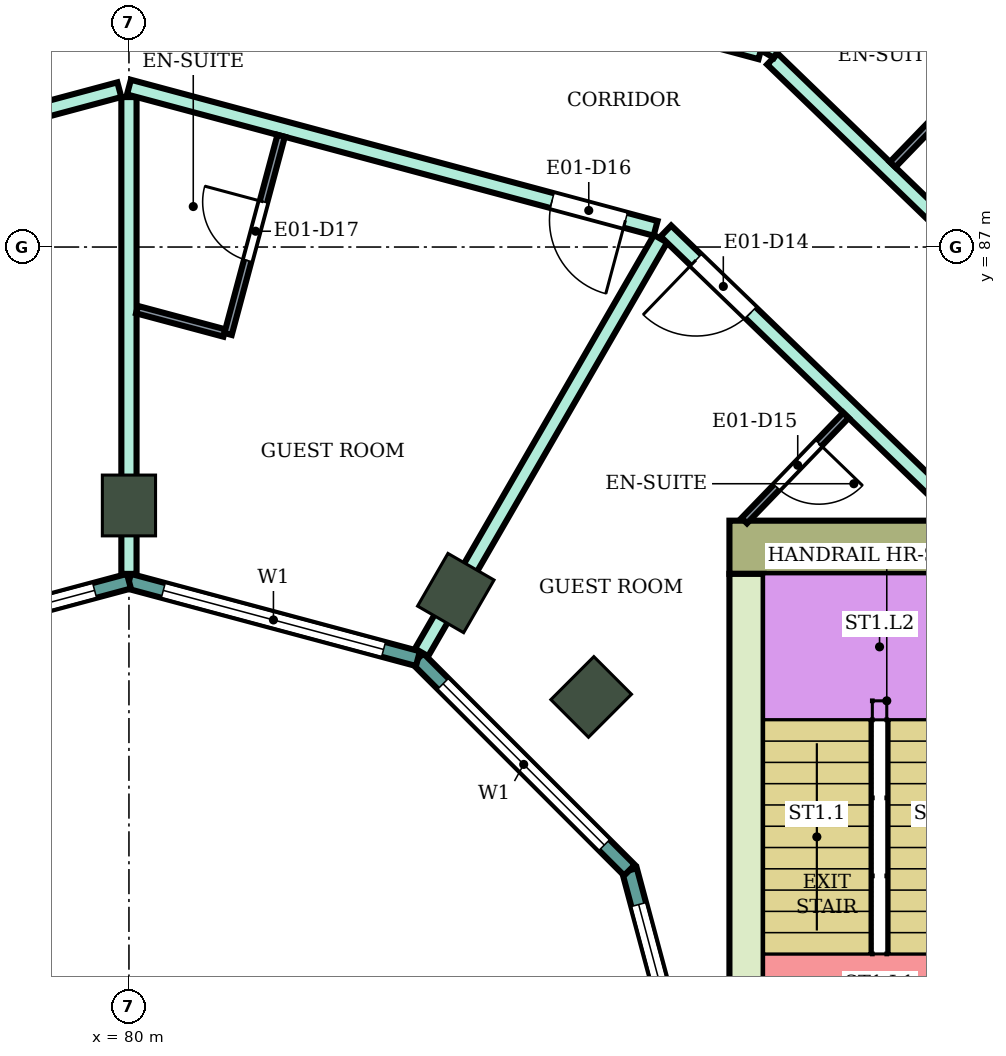
"""IFC4 building model, lengths in metres.
Left out: names, types, materials, properties, quantities, classifications, styles, units other than length and angle.
Written with IfcOpenShell. Run it as: python <this file> out.ifc"""

import sys

from ifc_helpers import new_model, si_unit, direction, frame, frame_2d, origin, origin_2d, place, context, subcontext, project, spatial, rectangle, extrude, element, fill, save


model = new_model("IFC4")
c1 = context("Model", 3, precision=1e-05, world=origin(), true_north=direction((0.0, 1.0)))
c2 = subcontext(c1, "Body", "Model", "MODEL_VIEW")
j1 = project(units=[si_unit("LENGTHUNIT", "METRE"), si_unit("PLANEANGLEUNIT", "RADIAN")], contexts=[c1])
p1 = place(None, origin())
s1 = spatial("IfcSite", under=j1, at=p1, CompositionType="ELEMENT")
p2 = place(p1, origin())
s2 = spatial("IfcBuilding", under=s1, at=p2, CompositionType="ELEMENT")
p3 = place(p2, frame((0.0, 0.0, 118.5)))
s3 = spatial("IfcBuildingStorey", under=s2, at=p3, CompositionType="ELEMENT", Elevation=118.5)
for number, where, z_axis, x_axis in (
    (1, (86.081, 81.081, 0.0), (0.0, 0.0, 1.0), (0.707, 0.707, 0.0)),
    (2, (84.3, 82.448, 0.0), (0.0, 0.0, 1.0), (0.5, 0.866, 0.0)),
    (3, (80.0, 83.6, 0.0), (0.0, 0.0, 1.0), (0.0, 1.0, 0.0)),
):
    element("IfcColumn", number, at=place(p3, frame(where, z_axis=z_axis, x_axis=x_axis)), inside=s3, PredefinedType="COLUMN", context=c2, shape_type="SweptSolid", body=[
        extrude(rectangle(XDim=0.8, YDim=0.7, at=origin_2d()), origin(), (0.0, 0.0, 1.0), 3.9),
    ])
p4 = place(p3, frame((87.9, 83.05, 0.0), z_axis=(0.0, 0.0, 1.0), x_axis=(1.0, 0.0, 0.0)))
e4 = element("IfcWall", 4, at=p4, inside=s3, PredefinedType="SHEAR", context=c2, shape_type="SweptSolid", body=[
    extrude(rectangle(XDim=14.8, YDim=0.7, at=frame_2d((7.4, 0.0))), origin(), (0.0, 0.0, 1.0), 3.58),
])
p5 = place(p4, frame((4.2, 0.0, 0.0)))
e5 = element("IfcOpeningElement", 5, at=p5, cuts=e4, PredefinedType="OPENING", context=c2, shape_type="SweptSolid", body=[
    extrude(rectangle(XDim=2.4, YDim=2.4, at=frame_2d((1.2, 1.2))), frame((0.0, 0.36, 0.0), z_axis=(0.0, -1.0, 0.0), x_axis=(1.0, 0.0, 0.0)), (0.0, 0.0, 1.0), 0.72),
])
p6 = place(p3, frame((88.125, 75.0, 0.0), z_axis=(0.0, 0.0, 1.0), x_axis=(0.0, 1.0, 0.0)))
e6 = element("IfcWall", 6, at=p6, inside=s3, PredefinedType="SHEAR", context=c2, shape_type="SweptSolid", body=[
    extrude(rectangle(XDim=7.7, YDim=0.45, at=frame_2d((3.85, 0.0))), origin(), (0.0, 0.0, 1.0), 3.58),
])
p7 = place(p3, frame((87.604, 75.0, 0.0), z_axis=(0.0, 0.0, 1.0), x_axis=(-0.258789828301, 0.965933654434, 0.0)))
e7 = element("IfcWall", 7, at=p7, inside=s3, PredefinedType="NOTDEFINED", context=c2, shape_type="SweptSolid", body=[
    extrude(rectangle(XDim=3.936, YDim=0.2, at=frame_2d((1.968, 0.0))), origin(), (0.0, 0.0, 1.0), 3.9),
])
p8 = place(p7, frame((0.468, 0.0, 0.9)))
e8 = element("IfcOpeningElement", 8, at=p8, cuts=e7, PredefinedType="OPENING", context=c2, shape_type="SweptSolid", body=[
    extrude(rectangle(XDim=3.0, YDim=2.3, at=frame_2d((1.5, 1.15))), frame((0.0, 0.11, 0.0), z_axis=(0.0, -1.0, 0.0), x_axis=(1.0, 0.0, 0.0)), (0.0, 0.0, 1.0), 0.22),
])
p9 = place(p3, frame((86.585, 78.802, 0.0), z_axis=(0.0, 0.0, 1.0), x_axis=(-0.707106781187, 0.707106781187, 0.0)))
e9 = element("IfcWall", 9, at=p9, inside=s3, PredefinedType="NOTDEFINED", context=c2, shape_type="SweptSolid", body=[
    extrude(rectangle(XDim=3.936, YDim=0.2, at=frame_2d((1.968, 0.0))), origin(), (0.0, 0.0, 1.0), 3.9),
])
p10 = place(p9, frame((0.468, 0.0, 0.9)))
e10 = element("IfcOpeningElement", 10, at=p10, cuts=e9, PredefinedType="OPENING", context=c2, shape_type="SweptSolid", body=[
    extrude(rectangle(XDim=3.0, YDim=2.3, at=frame_2d((1.5, 1.15))), frame((0.0, 0.11, 0.0), z_axis=(0.0, -1.0, 0.0), x_axis=(1.0, 0.0, 0.0)), (0.0, 0.0, 1.0), 0.22),
])
p11 = place(p3, frame((83.802, 81.585, 0.0), z_axis=(0.0, 0.0, 1.0), x_axis=(-0.965933654434, 0.258789828301, 0.0)))
e11 = element("IfcWall", 11, at=p11, inside=s3, PredefinedType="NOTDEFINED", context=c2, shape_type="SweptSolid", body=[
    extrude(rectangle(XDim=3.936, YDim=0.2, at=frame_2d((1.968, 0.0))), origin(), (0.0, 0.0, 1.0), 3.9),
])
p12 = place(p11, frame((0.468, 0.0, 0.9)))
e12 = element("IfcOpeningElement", 12, at=p12, cuts=e11, PredefinedType="OPENING", context=c2, shape_type="SweptSolid", body=[
    extrude(rectangle(XDim=3.0, YDim=2.3, at=frame_2d((1.5, 1.15))), frame((0.0, 0.11, 0.0), z_axis=(0.0, -1.0, 0.0), x_axis=(1.0, 0.0, 0.0)), (0.0, 0.0, 1.0), 0.22),
])
p13 = place(p3, frame((80.0, 82.604, 0.0), z_axis=(0.0, 0.0, 1.0), x_axis=(-0.965933654434, -0.258789828301, 0.0)))
e13 = element("IfcWall", 13, at=p13, inside=s3, PredefinedType="NOTDEFINED", context=c2, shape_type="SweptSolid", body=[
    extrude(rectangle(XDim=3.936, YDim=0.2, at=frame_2d((1.968, 0.0))), origin(), (0.0, 0.0, 1.0), 3.9),
])
p14 = place(p13, frame((0.468, 0.0, 0.9)))
e14 = element("IfcOpeningElement", 14, at=p14, cuts=e13, PredefinedType="OPENING", context=c2, shape_type="SweptSolid", body=[
    extrude(rectangle(XDim=3.0, YDim=2.3, at=frame_2d((1.5, 1.15))), frame((0.0, 0.11, 0.0), z_axis=(0.0, -1.0, 0.0), x_axis=(1.0, 0.0, 0.0)), (0.0, 0.0, 1.0), 0.22),
])
p15 = place(p3, frame((71.614, 89.55, 0.0), z_axis=(0.0, 0.0, 1.0), x_axis=(0.965967958589, 0.258661753994, 0.0)))
e15 = element("IfcWall", 15, at=p15, inside=s3, PredefinedType="PARTITIONING", context=c2, shape_type="SweptSolid", body=[
    extrude(rectangle(XDim=8.592, YDim=0.2, at=frame_2d((4.296, 0.0))), origin(), (0.0, 0.0, 1.0), 3.45),
])
p16 = place(p15, frame((0.55, 0.0, 0.0)))
e16 = element("IfcOpeningElement", 16, at=p16, cuts=e15, PredefinedType="OPENING", context=c2, shape_type="SweptSolid", body=[
    extrude(rectangle(XDim=1.0, YDim=2.1, at=frame_2d((0.5, 1.05))), frame((0.0, 0.11, 0.0), z_axis=(0.0, -1.0, 0.0), x_axis=(1.0, 0.0, 0.0)), (0.0, 0.0, 1.0), 0.22),
])
p17 = place(p3, frame((72.936, 87.211, 0.0), z_axis=(0.0, 0.0, 1.0), x_axis=(0.965917703859, 0.258849356521, 0.0)))
e17 = element("IfcWall", 17, at=p17, inside=s3, PredefinedType="PARTITIONING", context=c2, shape_type="SweptSolid", body=[
    extrude(rectangle(XDim=7.182, YDim=0.2, at=frame_2d((3.591, 0.0))), origin(), (0.0, 0.0, 1.0), 3.45),
])
p18 = place(p17, frame((2.757, 0.0, 0.0)))
e18 = element("IfcOpeningElement", 18, at=p18, cuts=e17, PredefinedType="OPENING", context=c2, shape_type="SweptSolid", body=[
    extrude(rectangle(XDim=1.8, YDim=2.1, at=frame_2d((0.9, 1.05))), frame((0.0, 0.11, 0.0), z_axis=(0.0, -1.0, 0.0), x_axis=(1.0, 0.0, 0.0)), (0.0, 0.0, 1.0), 0.22),
])
p19 = place(p3, frame((80.0, 82.7, 0.0), z_axis=(0.0, 0.0, 1.0), x_axis=(0.0, 1.0, 0.0)))
e19 = element("IfcWall", 19, at=p19, inside=s3, PredefinedType="PARTITIONING", context=c2, shape_type="SweptSolid", body=[
    extrude(rectangle(XDim=6.273, YDim=0.2, at=frame_2d((3.136, 0.0))), origin(), (0.0, 0.0, 1.0), 3.45),
])
p20 = place(p3, frame((80.0, 89.104, 0.0), z_axis=(0.0, 0.0, 1.0), x_axis=(0.965856548257, -0.259077455964, 0.0)))
e20 = element("IfcWall", 20, at=p20, inside=s3, PredefinedType="PARTITIONING", context=c2, shape_type="SweptSolid", body=[
    extrude(rectangle(XDim=7.173, YDim=0.2, at=frame_2d((3.586, 0.0))), origin(), (0.0, 0.0, 1.0), 3.45),
])
p21 = place(p20, frame((5.763, 0.0, 0.0)))
e21 = element("IfcOpeningElement", 21, at=p21, cuts=e20, PredefinedType="OPENING", context=c2, shape_type="SweptSolid", body=[
    extrude(rectangle(XDim=1.0, YDim=2.1, at=frame_2d((0.5, 1.05))), frame((0.0, 0.11, 0.0), z_axis=(0.0, -1.0, 0.0), x_axis=(1.0, 0.0, 0.0)), (0.0, 0.0, 1.0), 0.22),
])
p22 = place(p3, frame((80.0, 91.797, 0.0), z_axis=(0.0, 0.0, 1.0), x_axis=(0.965857042792, -0.259075612301, 0.0)))
e22 = element("IfcWall", 22, at=p22, inside=s3, PredefinedType="PARTITIONING", context=c2, shape_type="SweptSolid", body=[
    extrude(rectangle(XDim=8.602, YDim=0.2, at=frame_2d((4.301, 0.0))), origin(), (0.0, 0.0, 1.0), 3.45),
])
p23 = place(p22, frame((4.877, 0.0, 0.0)))
e23 = element("IfcOpeningElement", 23, at=p23, cuts=e22, PredefinedType="OPENING", context=c2, shape_type="SweptSolid", body=[
    extrude(rectangle(XDim=1.0, YDim=2.1, at=frame_2d((0.5, 1.05))), frame((0.0, 0.11, 0.0), z_axis=(0.0, -1.0, 0.0), x_axis=(1.0, 0.0, 0.0)), (0.0, 0.0, 1.0), 0.22),
])
p24 = place(p22, frame((2.817, 0.0, 0.0)))
e24 = element("IfcOpeningElement", 24, at=p24, cuts=e22, PredefinedType="OPENING", context=c2, shape_type="SweptSolid", body=[
    extrude(rectangle(XDim=1.0, YDim=2.1, at=frame_2d((0.5, 1.05))), frame((0.0, 0.11, 0.0), z_axis=(0.0, -1.0, 0.0), x_axis=(1.0, 0.0, 0.0)), (0.0, 0.0, 1.0), 0.22),
])
p25 = place(p3, frame((83.85, 81.667, 0.0), z_axis=(0.0, 0.0, 1.0), x_axis=(0.500224530691, 0.865895732115, 0.0)))
e25 = element("IfcWall", 25, at=p25, inside=s3, PredefinedType="PARTITIONING", context=c2, shape_type="SweptSolid", body=[
    extrude(rectangle(XDim=6.285, YDim=0.2, at=frame_2d((3.143, 0.0))), origin(), (0.0, 0.0, 1.0), 3.45),
])
p26 = place(p3, frame((87.064, 87.211, 0.0), z_axis=(0.0, 0.0, 1.0), x_axis=(0.719540958932, -0.694450004262, 0.0)))
e26 = element("IfcWall", 26, at=p26, inside=s3, PredefinedType="PARTITIONING", context=c2, shape_type="SweptSolid", body=[
    extrude(rectangle(XDim=5.488, YDim=0.2, at=frame_2d((2.744, 0.0))), origin(), (0.0, 0.0, 1.0), 3.45),
])
p27 = place(p26, frame((0.55, 0.0, 0.0)))
e27 = element("IfcOpeningElement", 27, at=p27, cuts=e26, PredefinedType="OPENING", context=c2, shape_type="SweptSolid", body=[
    extrude(rectangle(XDim=1.0, YDim=2.1, at=frame_2d((0.5, 1.05))), frame((0.0, 0.11, 0.0), z_axis=(0.0, -1.0, 0.0), x_axis=(1.0, 0.0, 0.0)), (0.0, 0.0, 1.0), 0.22),
])
p28 = place(p3, frame((88.466, 89.473, 0.0), z_axis=(0.0, 0.0, 1.0), x_axis=(0.719346014649, -0.694651935295, 0.0)))
e28 = element("IfcWall", 28, at=p28, inside=s3, PredefinedType="PARTITIONING", context=c2, shape_type="SweptSolid", body=[
    extrude(rectangle(XDim=6.525, YDim=0.2, at=frame_2d((3.263, 0.0))), origin(), (0.0, 0.0, 1.0), 3.45),
])
p29 = place(p28, frame((5.034, 0.0, 0.0)))
e29 = element("IfcOpeningElement", 29, at=p29, cuts=e28, PredefinedType="OPENING", context=c2, shape_type="SweptSolid", body=[
    extrude(rectangle(XDim=1.0, YDim=2.1, at=frame_2d((0.5, 1.05))), frame((0.0, 0.11, 0.0), z_axis=(0.0, -1.0, 0.0), x_axis=(1.0, 0.0, 0.0)), (0.0, 0.0, 1.0), 0.22),
])
p30 = place(p3, frame((88.398, 89.539, 0.0), z_axis=(0.0, 0.0, 1.0), x_axis=(0.500217530286, 0.865899776184, 0.0)))
e30 = element("IfcWall", 30, at=p30, inside=s3, PredefinedType="PARTITIONING", context=c2, shape_type="SweptSolid", body=[
    extrude(rectangle(XDim=9.006, YDim=0.2, at=frame_2d((4.503, 0.0))), origin(), (0.0, 0.0, 1.0), 3.45),
])
p31 = place(p3, frame((80.106, 86.177, 0.0), z_axis=(0.0, 0.0, 1.0), x_axis=(0.966002973184, -0.258530957139, 0.0)))
e31 = element("IfcWall", 31, at=p31, inside=s3, PredefinedType="PARTITIONING", context=c2, shape_type="SweptSolid", body=[
    extrude(rectangle(XDim=1.19, YDim=0.1, at=frame_2d((0.595, 0.0))), origin(), (0.0, 0.0, 1.0), 3.45),
])
p32 = place(p3, frame((81.304, 85.856, 0.0), z_axis=(0.0, 0.0, 1.0), x_axis=(0.25867580527, 0.965964195904, 0.0)))
e32 = element("IfcWall", 32, at=p32, inside=s3, PredefinedType="PARTITIONING", context=c2, shape_type="SweptSolid", body=[
    extrude(rectangle(XDim=2.699, YDim=0.1, at=frame_2d((1.35, 0.0))), origin(), (0.0, 0.0, 1.0), 3.45),
])
p33 = place(p32, frame((1.0, 0.0, 0.0)))
e33 = element("IfcOpeningElement", 33, at=p33, cuts=e32, PredefinedType="OPENING", context=c2, shape_type="SweptSolid", body=[
    extrude(rectangle(XDim=0.8, YDim=2.1, at=frame_2d((0.4, 1.05))), frame((0.0, 0.06, 0.0), z_axis=(0.0, -1.0, 0.0), x_axis=(1.0, 0.0, 0.0)), (0.0, 0.0, 1.0), 0.12),
])
p34 = place(p3, frame((88.095, 83.4, 0.0), z_axis=(0.0, 0.0, 1.0), x_axis=(0.694447472534, 0.719543402368, 0.0)))
e34 = element("IfcWall", 34, at=p34, inside=s3, PredefinedType="PARTITIONING", context=c2, shape_type="SweptSolid", body=[
    extrude(rectangle(XDim=1.926, YDim=0.1, at=frame_2d((0.963, 0.0))), origin(), (0.0, 0.0, 1.0), 3.45),
])
p35 = place(p34, frame((0.613, 0.0, 0.0)))
e35 = element("IfcOpeningElement", 35, at=p35, cuts=e34, PredefinedType="OPENING", context=c2, shape_type="SweptSolid", body=[
    extrude(rectangle(XDim=0.8, YDim=2.1, at=frame_2d((0.4, 1.05))), frame((0.0, 0.06, 0.0), z_axis=(0.0, -1.0, 0.0), x_axis=(1.0, 0.0, 0.0)), (0.0, 0.0, 1.0), 0.12),
])
p36 = place(p3, frame((90.048, 88.085, 0.0), z_axis=(0.0, 0.0, 1.0), x_axis=(0.694655834207, 0.71934224956, 0.0)))
e36 = element("IfcWall", 36, at=p36, inside=s3, PredefinedType="PARTITIONING", context=c2, shape_type="SweptSolid", body=[
    extrude(rectangle(XDim=2.7, YDim=0.1, at=frame_2d((1.35, 0.0))), origin(), (0.0, 0.0, 1.0), 3.45),
])
p37 = place(p8, origin())
e37 = element("IfcWindow", 37, at=p37, inside=s3, PartitioningType="SINGLE_PANEL", PredefinedType="WINDOW", context=c2, shape_type="SweptSolid", body=[
    extrude(rectangle(XDim=3.0, YDim=2.3, at=frame_2d((1.5, 1.15))), frame((0.0, 0.03, 0.0), z_axis=(0.0, -1.0, 0.0), x_axis=(1.0, 0.0, 0.0)), (0.0, 0.0, 1.0), 0.06),
])
fill(e8, e37)
p38 = place(p10, origin())
e38 = element("IfcWindow", 38, at=p38, inside=s3, PartitioningType="SINGLE_PANEL", PredefinedType="WINDOW", context=c2, shape_type="SweptSolid", body=[
    extrude(rectangle(XDim=3.0, YDim=2.3, at=frame_2d((1.5, 1.15))), frame((0.0, 0.03, 0.0), z_axis=(0.0, -1.0, 0.0), x_axis=(1.0, 0.0, 0.0)), (0.0, 0.0, 1.0), 0.06),
])
fill(e10, e38)
p39 = place(p12, origin())
e39 = element("IfcWindow", 39, at=p39, inside=s3, PartitioningType="SINGLE_PANEL", PredefinedType="WINDOW", context=c2, shape_type="SweptSolid", body=[
    extrude(rectangle(XDim=3.0, YDim=2.3, at=frame_2d((1.5, 1.15))), frame((0.0, 0.03, 0.0), z_axis=(0.0, -1.0, 0.0), x_axis=(1.0, 0.0, 0.0)), (0.0, 0.0, 1.0), 0.06),
])
fill(e12, e39)
p40 = place(p14, origin())
e40 = element("IfcWindow", 40, at=p40, inside=s3, PartitioningType="SINGLE_PANEL", PredefinedType="WINDOW", context=c2, shape_type="SweptSolid", body=[
    extrude(rectangle(XDim=3.0, YDim=2.3, at=frame_2d((1.5, 1.15))), frame((0.0, 0.03, 0.0), z_axis=(0.0, -1.0, 0.0), x_axis=(1.0, 0.0, 0.0)), (0.0, 0.0, 1.0), 0.06),
])
fill(e14, e40)
p41 = place(p27, frame((1.0, 0.0, 0.0), z_axis=(0.0, 0.0, 1.0), x_axis=(-1.0, 0.0, 0.0)))
e41 = element("IfcDoor", 41, at=p41, inside=s3, OperationType="SINGLE_SWING_RIGHT", PredefinedType="DOOR", context=c2, shape_type="SweptSolid", body=[
    extrude(rectangle(XDim=1.0, YDim=2.1, at=frame_2d((0.5, 1.05))), frame((0.0, 0.025, 0.0), z_axis=(0.0, -1.0, 0.0), x_axis=(1.0, 0.0, 0.0)), (0.0, 0.0, 1.0), 0.05),
])
fill(e27, e41)
p42 = place(p35, frame((0.8, 0.0, 0.0), z_axis=(0.0, 0.0, 1.0), x_axis=(-1.0, 0.0, 0.0)))
e42 = element("IfcDoor", 42, at=p42, inside=s3, OperationType="SINGLE_SWING_LEFT", PredefinedType="DOOR", context=c2, shape_type="SweptSolid", body=[
    extrude(rectangle(XDim=0.8, YDim=2.1, at=frame_2d((0.4, 1.05))), frame((0.0, 0.025, 0.0), z_axis=(0.0, -1.0, 0.0), x_axis=(1.0, 0.0, 0.0)), (0.0, 0.0, 1.0), 0.05),
])
fill(e35, e42)
p43 = place(p21, frame((1.0, 0.0, 0.0), z_axis=(0.0, 0.0, 1.0), x_axis=(-1.0, 0.0, 0.0)))
e43 = element("IfcDoor", 43, at=p43, inside=s3, OperationType="SINGLE_SWING_LEFT", PredefinedType="DOOR", context=c2, shape_type="SweptSolid", body=[
    extrude(rectangle(XDim=1.0, YDim=2.1, at=frame_2d((0.5, 1.05))), frame((0.0, 0.025, 0.0), z_axis=(0.0, -1.0, 0.0), x_axis=(1.0, 0.0, 0.0)), (0.0, 0.0, 1.0), 0.05),
])
fill(e21, e43)
p44 = place(p33, origin())
e44 = element("IfcDoor", 44, at=p44, inside=s3, OperationType="SINGLE_SWING_RIGHT", PredefinedType="DOOR", context=c2, shape_type="SweptSolid", body=[
    extrude(rectangle(XDim=0.8, YDim=2.1, at=frame_2d((0.4, 1.05))), frame((0.0, 0.025, 0.0), z_axis=(0.0, -1.0, 0.0), x_axis=(1.0, 0.0, 0.0)), (0.0, 0.0, 1.0), 0.05),
])
fill(e33, e44)
save(model, sys.argv[1])
